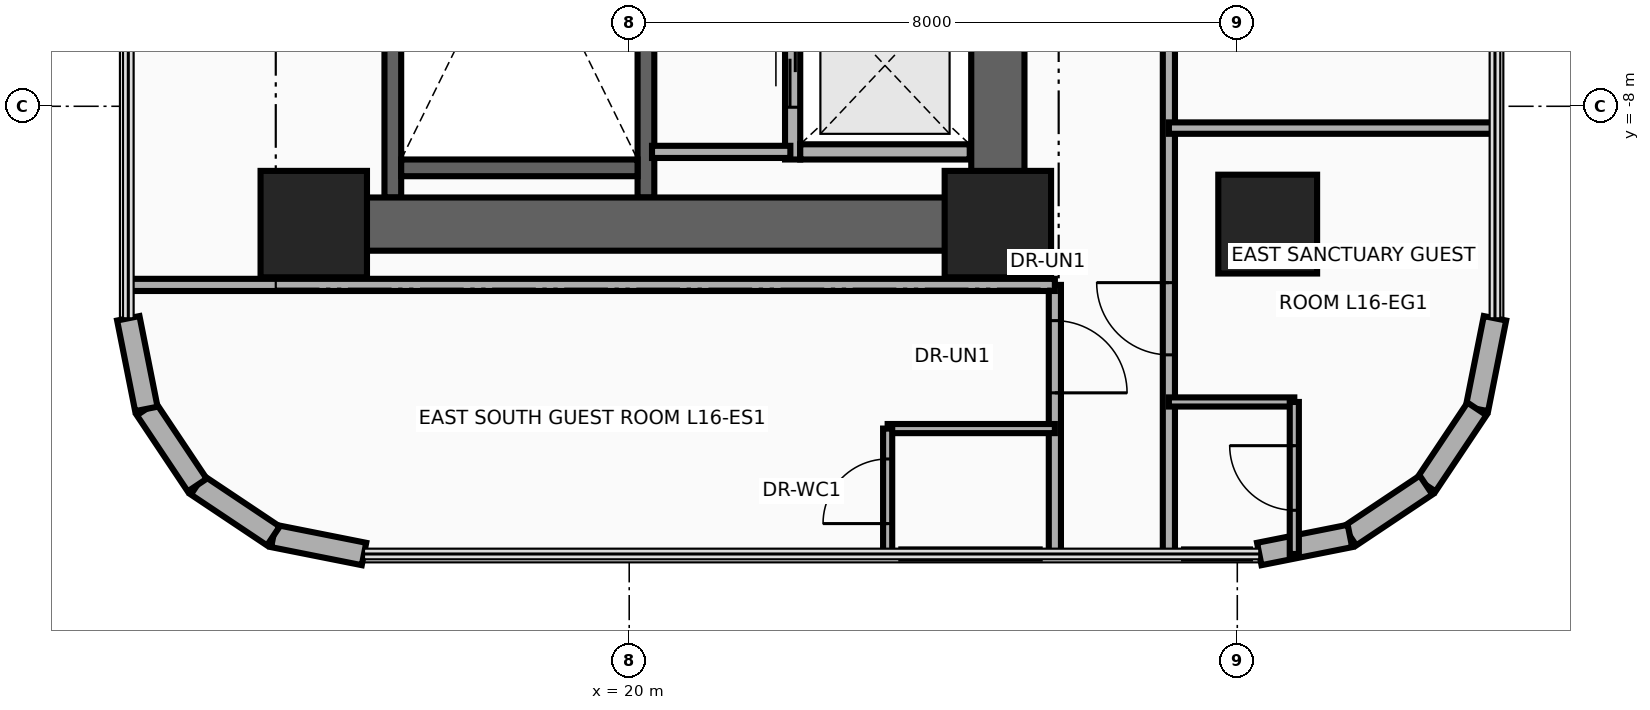
"""IFC4 building model, lengths in metres.
Left out: names, types, materials, properties, quantities, classifications, styles, units other than length and angle.
Written with IfcOpenShell. Run it as: python <this file> out.ifc"""

import sys

from ifc_helpers import new_model, si_unit, direction, frame, frame_2d, origin, origin_2d, place, context, subcontext, project, spatial, rectangle, circle, extrude, source, transform, mapped, element, fill, save


model = new_model("IFC4")
c1 = context("Model", 3, precision=1e-05, world=origin(), true_north=direction((0.0, 1.0)))
c2 = subcontext(c1, "Body", "Model", "MODEL_VIEW")
j1 = project(units=[si_unit("LENGTHUNIT", "METRE"), si_unit("PLANEANGLEUNIT", "RADIAN")], contexts=[c1])
p1 = place(None, origin())
s1 = spatial("IfcSite", under=j1, at=p1, CompositionType="ELEMENT")
p2 = place(p1, origin())
s2 = spatial("IfcBuilding", under=s1, at=p2, CompositionType="ELEMENT")
p3 = place(p2, frame((0.0, 0.0, 66.7)))
s3 = spatial("IfcBuildingStorey", under=s2, at=p3, CompositionType="ELEMENT", Elevation=66.7)
for number, where, z_axis, x_axis in (
    (1, (16.89, -9.2, 0.0), (0.0, 0.0, 1.0), (0.0, 1.0, 0.0)),
    (2, (20.22, -9.2, 0.0), (0.0, 0.0, 1.0), (0.0, 1.0, 0.0)),
):
    element("IfcWall", number, at=place(p3, frame(where, z_axis=z_axis, x_axis=x_axis)), inside=s3, PredefinedType="SHEAR", context=c2, shape_type="SweptSolid", body=[
        extrude(rectangle(XDim=8.52, YDim=0.22, at=frame_2d((4.26, 0.0))), origin(), (0.0, 0.0, 1.0), 3.46),
    ])
p4 = place(p3, frame((17.0, -8.81, 0.0), z_axis=(0.0, 0.0, 1.0), x_axis=(1.0, 0.0, 0.0)))
e3 = element("IfcWall", 3, at=p4, inside=s3, PredefinedType="SHEAR", context=c2, shape_type="SweptSolid", body=[
    extrude(rectangle(XDim=3.11, YDim=0.22, at=frame_2d((1.555, 0.0))), origin(), (0.0, 0.0, 1.0), 3.46),
])
p5 = place(p3, frame((24.85, -9.9, 0.0), z_axis=(0.0, 0.0, 1.0), x_axis=(0.0, 1.0, 0.0)))
e4 = element("IfcWall", 4, at=p5, inside=s3, PredefinedType="SHEAR", context=c2, shape_type="SweptSolid", body=[
    extrude(rectangle(XDim=8.95, YDim=0.7, at=frame_2d((4.475, 0.0))), origin(), (0.0, 0.0, 1.0), 3.46),
])
p6 = place(p3, frame((15.85, -9.55, 0.0), z_axis=(0.0, 0.0, 1.0), x_axis=(1.0, 0.0, 0.0)))
e5 = element("IfcWall", 5, at=p6, inside=s3, PredefinedType="SHEAR", context=c2, shape_type="SweptSolid", body=[
    extrude(rectangle(XDim=9.0, YDim=0.7, at=frame_2d((4.5, 0.0))), origin(), (0.0, 0.0, 1.0), 3.46),
])
m1 = source(origin(), c2, "Body", "SweptSolid", [
    extrude(rectangle(XDim=1.4, YDim=1.4, at=origin_2d()), origin(), (0.0, 0.0, 1.0), 3.7),
])
for number, where, z_axis, x_axis in (
    (6, (15.85, -9.55, 0.0), (0.0, 0.0, 1.0), (1.0, 0.0, 0.0)),
    (7, (24.85, -9.55, 0.0), (0.0, 0.0, 1.0), (1.0, 0.0, 0.0)),
):
    element("IfcColumn", number, at=place(p3, frame(where, z_axis=z_axis, x_axis=x_axis)), inside=s3, PredefinedType="COLUMN", context=c2, shape_type="MappedRepresentation", body=[
        mapped(m1, transform((0.0, 0.0, 0.0), x_axis=(1.0, 0.0, 0.0), y_axis=(0.0, 1.0, 0.0), z_axis=(0.0, 0.0, 1.0), scale=1.0)),
    ])
m2 = source(origin(), c2, "Body", "SweptSolid", [
    extrude(circle(Radius=0.65, at=origin_2d()), origin(), (0.0, 0.0, 1.0), 3.7),
])
p7 = place(p3, frame((28.4, -9.55, 0.0), z_axis=(0.0, 0.0, 1.0), x_axis=(1.0, 0.0, 0.0)))
e8 = element("IfcColumn", 8, at=p7, inside=s3, PredefinedType="COLUMN", context=c2, shape_type="MappedRepresentation", body=[
    mapped(m2, transform((0.0, 0.0, 0.0), x_axis=(1.0, 0.0, 0.0), y_axis=(0.0, 1.0, 0.0), z_axis=(0.0, 0.0, 1.0), scale=1.0)),
])
p8 = place(p3, frame((31.39, -10.789, 0.0), z_axis=(0.0, 0.0, 1.0), x_axis=(-0.194996050505, -0.980804027463, 0.0)))
e9 = element("IfcWall", 9, at=p8, inside=s3, PredefinedType="SOLIDWALL", context=c2, shape_type="SweptSolid", body=[
    extrude(rectangle(XDim=1.216, YDim=0.3, at=frame_2d((0.608, 0.0))), origin(), (0.0, 0.0, 1.0), 3.46),
])
for number, where, z_axis, x_axis in (
    (10, (31.153, -11.982, 0.0), (0.0, 0.0, 1.0), (-0.556, -0.831, 0.0)),
    (11, (30.483, -12.983, 0.0), (0.0, 0.0, 1.0), (-0.831, -0.556, 0.0)),
):
    element("IfcWall", number, at=place(p3, frame(where, z_axis=z_axis, x_axis=x_axis)), inside=s3, PredefinedType="SOLIDWALL", context=c2, shape_type="SweptSolid", body=[
        extrude(rectangle(XDim=1.205, YDim=0.3, at=frame_2d((0.603, 0.0))), origin(), (0.0, 0.0, 1.0), 3.46),
    ])
for number, where, z_axis, x_axis in (
    (12, (29.482, -13.653, 0.0), (0.0, 0.0, 1.0), (-0.981, -0.195, 0.0)),
    (13, (16.511, -13.89, 0.0), (0.0, 0.0, 1.0), (-0.981, 0.195, 0.0)),
):
    element("IfcWall", number, at=place(p3, frame(where, z_axis=z_axis, x_axis=x_axis)), inside=s3, PredefinedType="SOLIDWALL", context=c2, shape_type="SweptSolid", body=[
        extrude(rectangle(XDim=1.216, YDim=0.3, at=frame_2d((0.608, 0.0))), origin(), (0.0, 0.0, 1.0), 3.46),
    ])
for number, where, z_axis, x_axis in (
    (14, (15.318, -13.653, 0.0), (0.0, 0.0, 1.0), (-0.831, 0.556, 0.0)),
    (15, (14.317, -12.983, 0.0), (0.0, 0.0, 1.0), (-0.556, 0.831, 0.0)),
):
    element("IfcWall", number, at=place(p3, frame(where, z_axis=z_axis, x_axis=x_axis)), inside=s3, PredefinedType="SOLIDWALL", context=c2, shape_type="SweptSolid", body=[
        extrude(rectangle(XDim=1.205, YDim=0.3, at=frame_2d((0.603, 0.0))), origin(), (0.0, 0.0, 1.0), 3.46),
    ])
p9 = place(p3, frame((13.647, -11.982, 0.0), z_axis=(0.0, 0.0, 1.0), x_axis=(-0.195189223115, 0.980765602568, 0.0)))
e16 = element("IfcWall", 16, at=p9, inside=s3, PredefinedType="SOLIDWALL", context=c2, shape_type="SweptSolid", body=[
    extrude(rectangle(XDim=1.216, YDim=0.3, at=frame_2d((0.608, 0.0))), origin(), (0.0, 0.0, 1.0), 3.46),
])
p10 = place(p3, frame((22.15, -8.7, 0.0), z_axis=(0.0, 0.0, 1.0), x_axis=(0.0, 1.0, 0.0)))
e17 = element("IfcWall", 17, at=p10, inside=s3, PredefinedType="MOVABLE", context=c2, shape_type="SweptSolid", body=[
    extrude(rectangle(XDim=2.475, YDim=0.2, at=frame_2d((1.237, 0.0))), origin(), (0.0, 0.0, 1.0), 3.46),
])
p11 = place(p10, frame((0.688, 0.0, 0.0)))
e18 = element("IfcOpeningElement", 18, at=p11, cuts=e17, PredefinedType="OPENING", context=c2, shape_type="SweptSolid", body=[
    extrude(rectangle(XDim=1.1, YDim=2.1, at=frame_2d((0.55, 1.05))), frame((0.0, 0.115, 0.0), z_axis=(0.0, -1.0, 0.0), x_axis=(1.0, 0.0, 0.0)), (0.0, 0.0, 1.0), 0.23),
])
p12 = place(p3, frame((22.25, -8.6, 0.0), z_axis=(0.0, 0.0, 1.0), x_axis=(1.0, 0.0, 0.0)))
e19 = element("IfcWall", 19, at=p12, inside=s3, PredefinedType="MOVABLE", context=c2, shape_type="SweptSolid", body=[
    extrude(rectangle(XDim=2.23, YDim=0.2, at=frame_2d((1.115, 0.0))), origin(), (0.0, 0.0, 1.0), 3.46),
])
p13 = place(p3, frame((20.3, -8.6, 0.0), z_axis=(0.0, 0.0, 1.0), x_axis=(1.0, 0.0, 0.0)))
e20 = element("IfcWall", 20, at=p13, inside=s3, PredefinedType="PARTITIONING", context=c2, shape_type="SweptSolid", body=[
    extrude(rectangle(XDim=1.82, YDim=0.16, at=frame_2d((0.91, 0.0))), origin(), (0.0, 0.0, 1.0), 3.46),
])
p14 = place(p3, frame((25.6, -13.89, 0.0), z_axis=(0.0, 0.0, 1.0), x_axis=(0.0, 1.0, 0.0)))
e21 = element("IfcWall", 21, at=p14, inside=s3, PredefinedType="PARTITIONING", context=c2, shape_type="SweptSolid", body=[
    extrude(rectangle(XDim=3.54, YDim=0.16, at=frame_2d((1.77, 0.0))), origin(), (0.0, 0.0, 1.0), 3.46),
])
p15 = place(p14, frame((2.12, 0.0, 0.0)))
e22 = element("IfcOpeningElement", 22, at=p15, cuts=e21, PredefinedType="OPENING", context=c2, shape_type="SweptSolid", body=[
    extrude(rectangle(XDim=0.95, YDim=2.15, at=frame_2d((0.475, 1.075))), frame((0.0, 0.095, 0.0), z_axis=(0.0, -1.0, 0.0), x_axis=(1.0, 0.0, 0.0)), (0.0, 0.0, 1.0), 0.19),
])
p16 = place(p3, frame((13.41, -10.35, 0.0), z_axis=(0.0, 0.0, 1.0), x_axis=(1.0, 0.0, 0.0)))
e23 = element("IfcWall", 23, at=p16, inside=s3, PredefinedType="PARTITIONING", context=c2, shape_type="SweptSolid", body=[
    extrude(rectangle(XDim=12.19, YDim=0.16, at=frame_2d((6.095, 0.0))), origin(), (0.0, 0.0, 1.0), 3.46),
])
p17 = place(p3, frame((23.4, -12.24, 0.0), z_axis=(0.0, 0.0, 1.0), x_axis=(1.0, 0.0, 0.0)))
e24 = element("IfcWall", 24, at=p17, inside=s3, PredefinedType="PARTITIONING", context=c2, shape_type="SweptSolid", body=[
    extrude(rectangle(XDim=2.2, YDim=0.12, at=frame_2d((1.1, 0.0))), origin(), (0.0, 0.0, 1.0), 3.46),
])
p18 = place(p3, frame((23.4, -13.89, 0.0), z_axis=(0.0, 0.0, 1.0), x_axis=(0.0, 1.0, 0.0)))
e25 = element("IfcWall", 25, at=p18, inside=s3, PredefinedType="PARTITIONING", context=c2, shape_type="SweptSolid", body=[
    extrude(rectangle(XDim=1.65, YDim=0.12, at=frame_2d((0.825, 0.0))), origin(), (0.0, 0.0, 1.0), 3.46),
])
p19 = place(p18, frame((0.4, 0.0, 0.0)))
e26 = element("IfcOpeningElement", 26, at=p19, cuts=e25, PredefinedType="OPENING", context=c2, shape_type="SweptSolid", body=[
    extrude(rectangle(XDim=0.85, YDim=2.1, at=frame_2d((0.425, 1.05))), frame((0.0, 0.075, 0.0), z_axis=(0.0, -1.0, 0.0), x_axis=(1.0, 0.0, 0.0)), (0.0, 0.0, 1.0), 0.15),
])
p20 = place(p3, frame((23.58, -13.89, 0.0), z_axis=(0.0, 0.0, 1.0), x_axis=(1.0, 0.0, 0.0)))
e27 = element("IfcWall", 27, at=p20, inside=s3, PredefinedType="PARTITIONING", context=c2, shape_type="SweptSolid", body=[
    extrude(rectangle(XDim=1.82, YDim=0.12, at=frame_2d((0.91, 0.0))), origin(), (0.0, 0.0, 1.0), 3.46),
])
p21 = place(p3, frame((27.1, -13.89, 0.0), z_axis=(0.0, 0.0, 1.0), x_axis=(0.0, 1.0, 0.0)))
e28 = element("IfcWall", 28, at=p21, inside=s3, PredefinedType="PARTITIONING", context=c2, shape_type="SweptSolid", body=[
    extrude(rectangle(XDim=25.74, YDim=0.16, at=frame_2d((12.87, 0.0))), origin(), (0.0, 0.0, 1.0), 2.583),
])
p22 = place(p21, frame((2.62, 0.0, 0.0)))
e29 = element("IfcOpeningElement", 29, at=p22, cuts=e28, PredefinedType="OPENING", context=c2, shape_type="SweptSolid", body=[
    extrude(rectangle(XDim=0.95, YDim=2.15, at=frame_2d((0.475, 1.075))), frame((0.0, 0.095, 0.0), z_axis=(0.0, -1.0, 0.0), x_axis=(1.0, 0.0, 0.0)), (0.0, 0.0, 1.0), 0.19),
])
p23 = place(p21, frame((8.484, 0.0, 0.0)))
e30 = element("IfcOpeningElement", 30, at=p23, cuts=e28, PredefinedType="OPENING", context=c2, shape_type="SweptSolid", body=[
    extrude(rectangle(XDim=0.95, YDim=2.15, at=frame_2d((0.475, 1.075))), frame((0.0, 0.095, 0.0), z_axis=(0.0, -1.0, 0.0), x_axis=(1.0, 0.0, 0.0)), (0.0, 0.0, 1.0), 0.19),
])
p24 = place(p21, frame((14.197, 0.0, 0.0)))
e31 = element("IfcOpeningElement", 31, at=p24, cuts=e28, PredefinedType="OPENING", context=c2, shape_type="SweptSolid", body=[
    extrude(rectangle(XDim=0.95, YDim=2.15, at=frame_2d((0.475, 1.075))), frame((0.0, 0.095, 0.0), z_axis=(0.0, -1.0, 0.0), x_axis=(1.0, 0.0, 0.0)), (0.0, 0.0, 1.0), 0.19),
])
p25 = place(p21, frame((21.648, 0.0, 0.0)))
e32 = element("IfcOpeningElement", 32, at=p25, cuts=e28, PredefinedType="OPENING", context=c2, shape_type="SweptSolid", body=[
    extrude(rectangle(XDim=0.95, YDim=2.15, at=frame_2d((0.475, 1.075))), frame((0.0, 0.095, 0.0), z_axis=(0.0, -1.0, 0.0), x_axis=(1.0, 0.0, 0.0)), (0.0, 0.0, 1.0), 0.19),
])
p26 = place(p3, frame((27.1, -8.287, 0.0), z_axis=(0.0, 0.0, 1.0), x_axis=(1.0, 0.0, 0.0)))
e33 = element("IfcWall", 33, at=p26, inside=s3, PredefinedType="PARTITIONING", context=c2, shape_type="SweptSolid", body=[
    extrude(rectangle(XDim=4.29, YDim=0.15, at=frame_2d((2.145, 0.0))), origin(), (0.0, 0.0, 1.0), 2.896),
])
p27 = place(p3, frame((27.1, -11.89, 0.0), z_axis=(0.0, 0.0, 1.0), x_axis=(1.0, 0.0, 0.0)))
e34 = element("IfcWall", 34, at=p27, inside=s3, PredefinedType="PARTITIONING", context=c2, shape_type="SweptSolid", body=[
    extrude(rectangle(XDim=1.65, YDim=0.12, at=frame_2d((0.825, 0.0))), origin(), (0.0, 0.0, 1.0), 3.46),
])
p28 = place(p3, frame((28.75, -13.89, 0.0), z_axis=(0.0, 0.0, 1.0), x_axis=(0.0, 1.0, 0.0)))
e35 = element("IfcWall", 35, at=p28, inside=s3, PredefinedType="PARTITIONING", context=c2, shape_type="SweptSolid", body=[
    extrude(rectangle(XDim=2.0, YDim=0.12, at=frame_2d((1.0, 0.0))), origin(), (0.0, 0.0, 1.0), 3.46),
])
p29 = place(p28, frame((0.575, 0.0, 0.0)))
e36 = element("IfcOpeningElement", 36, at=p29, cuts=e35, PredefinedType="OPENING", context=c2, shape_type="SweptSolid", body=[
    extrude(rectangle(XDim=0.85, YDim=2.1, at=frame_2d((0.425, 1.05))), frame((0.0, 0.075, 0.0), z_axis=(0.0, -1.0, 0.0), x_axis=(1.0, 0.0, 0.0)), (0.0, 0.0, 1.0), 0.15),
])
p30 = place(p3, frame((27.3, -13.89, 0.0), z_axis=(0.0, 0.0, 1.0), x_axis=(1.0, 0.0, 0.0)))
e37 = element("IfcWall", 37, at=p30, inside=s3, PredefinedType="PARTITIONING", context=c2, shape_type="SweptSolid", body=[
    extrude(rectangle(XDim=0.867, YDim=0.12, at=frame_2d((0.433, 0.0))), origin(), (0.0, 0.0, 1.0), 3.46),
])
p31 = place(p11, origin())
e38 = element("IfcDoor", 38, at=p31, inside=s3, OperationType="DOUBLE_DOOR_SLIDING", PredefinedType="DOOR", context=c2, shape_type="SweptSolid", body=[
    extrude(rectangle(XDim=1.1, YDim=2.1, at=frame_2d((0.55, 1.05))), frame((0.0, 0.025, 0.0), z_axis=(0.0, -1.0, 0.0), x_axis=(1.0, 0.0, 0.0)), (0.0, 0.0, 1.0), 0.05),
])
fill(e18, e38)
p32 = place(p15, frame((0.95, 0.0, 0.0), z_axis=(0.0, 0.0, 1.0), x_axis=(-1.0, 0.0, 0.0)))
e39 = element("IfcDoor", 39, at=p32, inside=s3, OperationType="SINGLE_SWING_LEFT", PredefinedType="DOOR", context=c2, shape_type="SweptSolid", body=[
    extrude(rectangle(XDim=0.95, YDim=2.15, at=frame_2d((0.475, 1.075))), frame((0.0, 0.025, 0.0), z_axis=(0.0, -1.0, 0.0), x_axis=(1.0, 0.0, 0.0)), (0.0, 0.0, 1.0), 0.05),
])
fill(e22, e39)
p33 = place(p19, origin())
e40 = element("IfcDoor", 40, at=p33, inside=s3, OperationType="SINGLE_SWING_RIGHT", PredefinedType="DOOR", context=c2, shape_type="SweptSolid", body=[
    extrude(rectangle(XDim=0.85, YDim=2.1, at=frame_2d((0.425, 1.05))), frame((0.0, 0.025, 0.0), z_axis=(0.0, -1.0, 0.0), x_axis=(1.0, 0.0, 0.0)), (0.0, 0.0, 1.0), 0.05),
])
fill(e26, e40)
p34 = place(p22, origin())
e41 = element("IfcDoor", 41, at=p34, inside=s3, OperationType="SINGLE_SWING_RIGHT", PredefinedType="DOOR", context=c2, shape_type="SweptSolid", body=[
    extrude(rectangle(XDim=0.95, YDim=2.15, at=frame_2d((0.475, 1.075))), frame((0.0, 0.025, 0.0), z_axis=(0.0, -1.0, 0.0), x_axis=(1.0, 0.0, 0.0)), (0.0, 0.0, 1.0), 0.05),
])
fill(e29, e41)
p35 = place(p29, origin())
e42 = element("IfcDoor", 42, at=p35, inside=s3, OperationType="SINGLE_SWING_LEFT", PredefinedType="DOOR", context=c2, shape_type="SweptSolid", body=[
    extrude(rectangle(XDim=0.85, YDim=2.1, at=frame_2d((0.425, 1.05))), frame((0.0, 0.025, 0.0), z_axis=(0.0, -1.0, 0.0), x_axis=(1.0, 0.0, 0.0)), (0.0, 0.0, 1.0), 0.05),
])
fill(e36, e42)
save(model, sys.argv[1])
